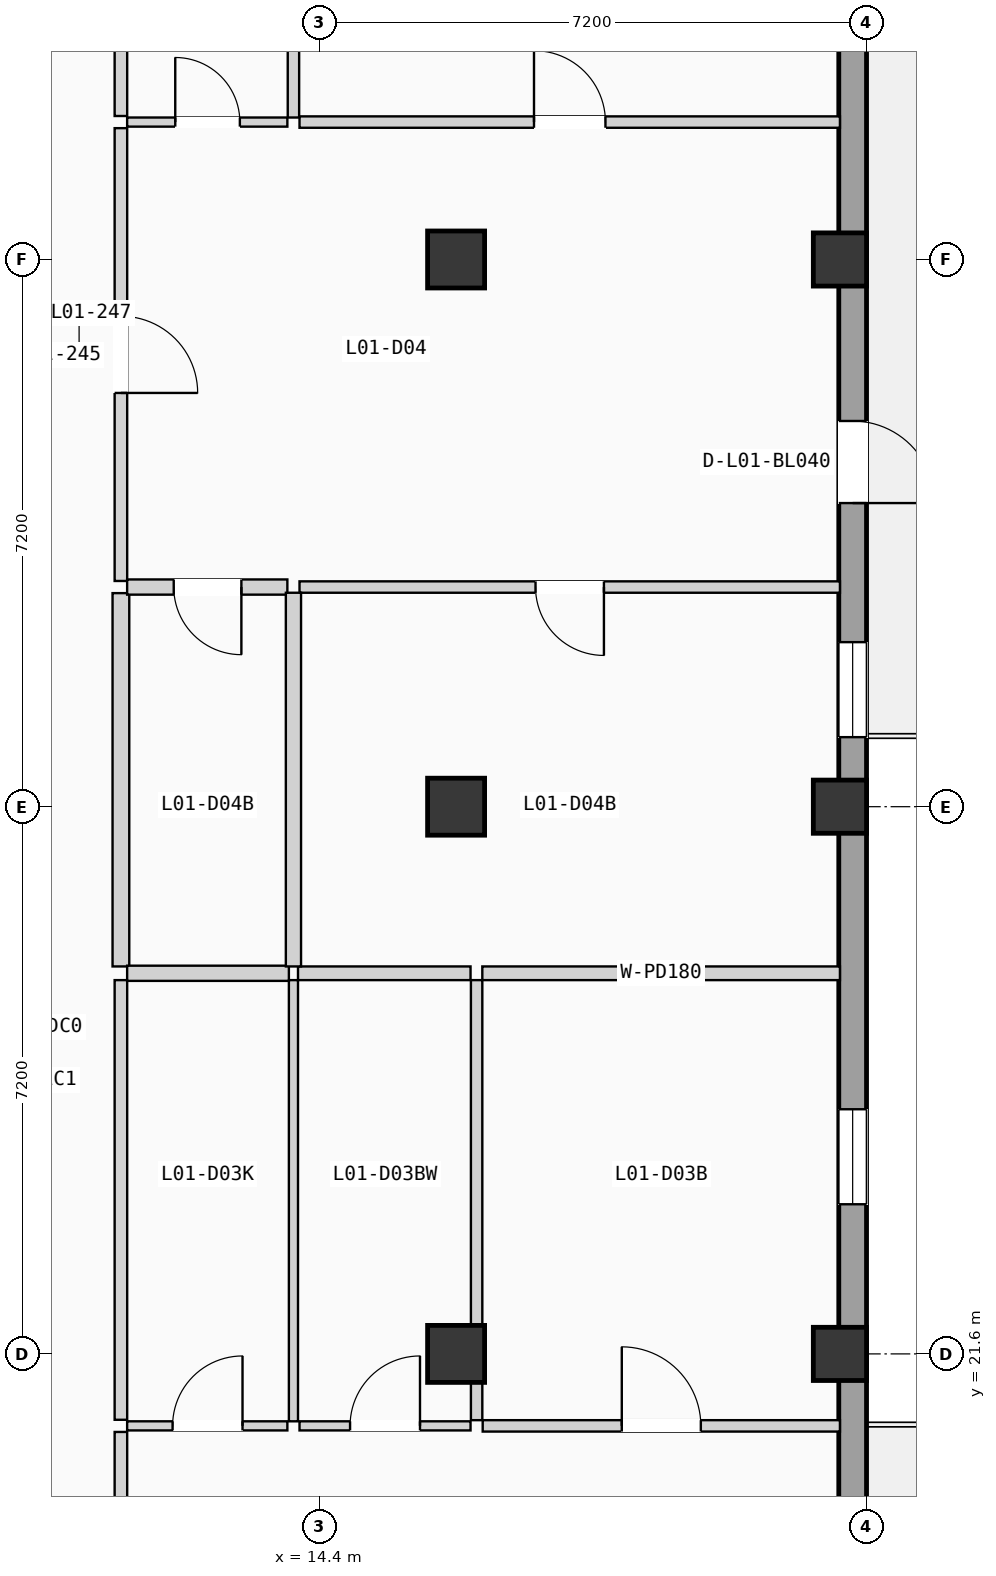
"""IFC4 building model, lengths in metres.
Left out: names, types, materials, properties, quantities, classifications, styles, units other than length and angle.
Written with IfcOpenShell. Run it as: python <this file> out.ifc"""

import sys

from ifc_helpers import new_model, si_unit, direction, frame, frame_2d, origin, origin_2d, place, context, subcontext, project, spatial, rectangle, extrude, element, fill, save


model = new_model("IFC4")
c1 = context("Model", 3, precision=1e-05, world=origin(), true_north=direction((0.0, 1.0)))
c2 = subcontext(c1, "Body", "Model", "MODEL_VIEW")
j1 = project(units=[si_unit("LENGTHUNIT", "METRE"), si_unit("PLANEANGLEUNIT", "RADIAN")], contexts=[c1])
p1 = place(None, origin())
s1 = spatial("IfcSite", under=j1, at=p1, CompositionType="ELEMENT")
p2 = place(p1, origin())
s2 = spatial("IfcBuilding", under=s1, at=p2, CompositionType="ELEMENT")
p3 = place(p2, frame((0.0, 0.0, 4.9)))
s3 = spatial("IfcBuildingStorey", under=s2, at=p3, CompositionType="ELEMENT", Elevation=4.9)
for number, where, z_axis, x_axis in (
    (1, (16.2, 21.6, 0.0), (0.0, 0.0, 1.0), (1.0, 0.0, 0.0)),
    (2, (16.2, 28.8, 0.0), (0.0, 0.0, 1.0), (1.0, 0.0, 0.0)),
    (3, (16.2, 36.0, 0.0), (0.0, 0.0, 1.0), (1.0, 0.0, 0.0)),
):
    element("IfcColumn", number, at=place(p3, frame(where, z_axis=z_axis, x_axis=x_axis)), inside=s3, PredefinedType="COLUMN", context=c2, shape_type="SweptSolid", body=[
        extrude(rectangle(XDim=0.75, YDim=0.75, at=origin_2d()), origin(), (0.0, 0.0, 1.0), 3.675),
    ])
for number, where, z_axis, x_axis in (
    (4, (21.25, 21.6, 0.0), (0.0, 0.0, 1.0), (1.0, 0.0, 0.0)),
    (5, (21.25, 28.8, 0.0), (0.0, 0.0, 1.0), (1.0, 0.0, 0.0)),
    (6, (21.25, 36.0, 0.0), (0.0, 0.0, 1.0), (1.0, 0.0, 0.0)),
):
    element("IfcColumn", number, at=place(p3, frame(where, z_axis=z_axis, x_axis=x_axis)), inside=s3, PredefinedType="COLUMN", context=c2, shape_type="SweptSolid", body=[
        extrude(rectangle(XDim=0.7, YDim=0.7, at=origin_2d()), origin(), (0.0, 0.0, 1.0), 3.675),
    ])
p4 = place(p3, frame((21.417, 0.365, 0.0), z_axis=(0.0, 0.0, 1.0), x_axis=(0.0, 1.0, 0.0)))
e7 = element("IfcWall", 7, at=p4, inside=s3, PredefinedType="SOLIDWALL", context=c2, shape_type="SweptSolid", body=[
    extrude(rectangle(XDim=49.67, YDim=0.365, at=frame_2d((24.835, 0.0))), origin(), (0.0, 0.0, 1.0), 3.415),
])
p5 = place(p4, frame((16.335, 0.0, 0.0)))
e8 = element("IfcOpeningElement", 8, at=p5, cuts=e7, PredefinedType="OPENING", context=c2, shape_type="SweptSolid", body=[
    extrude(rectangle(XDim=0.95, YDim=2.15, at=frame_2d((0.475, 1.075))), frame((0.0, 0.192, 0.0), z_axis=(0.0, -1.0, 0.0), x_axis=(1.0, 0.0, 0.0)), (0.0, 0.0, 1.0), 0.385),
])
p6 = place(p4, frame((9.502, 0.0, 0.9)))
e9 = element("IfcOpeningElement", 9, at=p6, cuts=e7, PredefinedType="OPENING", context=c2, shape_type="SweptSolid", body=[
    extrude(rectangle(XDim=1.25, YDim=1.2, at=frame_2d((0.625, 0.6))), frame((0.0, 0.192, 0.0), z_axis=(0.0, -1.0, 0.0), x_axis=(1.0, 0.0, 0.0)), (0.0, 0.0, 1.0), 0.385),
])
p7 = place(p4, frame((23.204, 0.0, 0.9)))
e10 = element("IfcOpeningElement", 10, at=p7, cuts=e7, PredefinedType="OPENING", context=c2, shape_type="SweptSolid", body=[
    extrude(rectangle(XDim=1.25, YDim=1.35, at=frame_2d((0.625, 0.675))), frame((0.0, 0.192, 0.0), z_axis=(0.0, -1.0, 0.0), x_axis=(1.0, 0.0, 0.0)), (0.0, 0.0, 1.0), 0.385),
])
p8 = place(p4, frame((32.43, 0.0, 0.0)))
e11 = element("IfcOpeningElement", 11, at=p8, cuts=e7, PredefinedType="OPENING", context=c2, shape_type="SweptSolid", body=[
    extrude(rectangle(XDim=1.08, YDim=2.18, at=frame_2d((0.54, 1.09))), frame((0.0, 0.192, 0.0), z_axis=(0.0, -1.0, 0.0), x_axis=(1.0, 0.0, 0.0)), (0.0, 0.0, 1.0), 0.385),
])
p9 = place(p4, frame((29.35, 0.0, 0.9)))
e12 = element("IfcOpeningElement", 12, at=p9, cuts=e7, PredefinedType="OPENING", context=c2, shape_type="SweptSolid", body=[
    extrude(rectangle(XDim=1.25, YDim=1.5, at=frame_2d((0.625, 0.75))), frame((0.0, 0.192, 0.0), z_axis=(0.0, -1.0, 0.0), x_axis=(1.0, 0.0, 0.0)), (0.0, 0.0, 1.0), 0.385),
])
p10 = place(p4, frame((39.354, 0.0, 0.9)))
e13 = element("IfcOpeningElement", 13, at=p10, cuts=e7, PredefinedType="OPENING", context=c2, shape_type="SweptSolid", body=[
    extrude(rectangle(XDim=1.25, YDim=1.65, at=frame_2d((0.625, 0.825))), frame((0.0, 0.192, 0.0), z_axis=(0.0, -1.0, 0.0), x_axis=(1.0, 0.0, 0.0)), (0.0, 0.0, 1.0), 0.385),
])
p11 = place(p3, frame((11.79, 13.545, 0.0), z_axis=(0.0, 0.0, 1.0), x_axis=(0.0, 1.0, 0.0)))
e14 = element("IfcWall", 14, at=p11, inside=s3, PredefinedType="PARTITIONING", context=c2, shape_type="SweptSolid", body=[
    extrude(rectangle(XDim=7.028, YDim=0.165, at=frame_2d((3.514, 0.0))), origin(), (0.0, 0.0, 1.0), 3.395),
])
p12 = place(p11, frame((3.009, 0.0, 0.0)))
e15 = element("IfcOpeningElement", 15, at=p12, cuts=e14, PredefinedType="OPENING", context=c2, shape_type="SweptSolid", body=[
    extrude(rectangle(XDim=1.01, YDim=2.11, at=frame_2d((0.505, 1.055))), frame((0.0, 0.093, 0.0), z_axis=(0.0, -1.0, 0.0), x_axis=(1.0, 0.0, 0.0)), (0.0, 0.0, 1.0), 0.185),
])
p13 = place(p3, frame((11.79, 20.733, 0.0), z_axis=(0.0, 0.0, 1.0), x_axis=(0.0, 1.0, 0.0)))
e16 = element("IfcWall", 16, at=p13, inside=s3, PredefinedType="PARTITIONING", context=c2, shape_type="SweptSolid", body=[
    extrude(rectangle(XDim=5.785, YDim=0.165, at=frame_2d((2.893, 0.0))), origin(), (0.0, 0.0, 1.0), 3.395),
])
p14 = place(p3, frame((11.79, 31.77, 0.0), z_axis=(0.0, 0.0, 1.0), x_axis=(0.0, 1.0, 0.0)))
e17 = element("IfcWall", 17, at=p14, inside=s3, PredefinedType="PARTITIONING", context=c2, shape_type="SweptSolid", body=[
    extrude(rectangle(XDim=5.958, YDim=0.165, at=frame_2d((2.979, 0.0))), origin(), (0.0, 0.0, 1.0), 3.395),
])
p15 = place(p14, frame((2.474, 0.0, 0.0)))
e18 = element("IfcOpeningElement", 18, at=p15, cuts=e17, PredefinedType="OPENING", context=c2, shape_type="SweptSolid", body=[
    extrude(rectangle(XDim=1.01, YDim=2.11, at=frame_2d((0.505, 1.055))), frame((0.0, 0.093, 0.0), z_axis=(0.0, -1.0, 0.0), x_axis=(1.0, 0.0, 0.0)), (0.0, 0.0, 1.0), 0.185),
])
p16 = place(p3, frame((11.79, 26.698, 0.0), z_axis=(0.0, 0.0, 1.0), x_axis=(0.0, 1.0, 0.0)))
e19 = element("IfcWall", 19, at=p16, inside=s3, PredefinedType="PLUMBINGWALL", context=c2, shape_type="SweptSolid", body=[
    extrude(rectangle(XDim=4.912, YDim=0.22, at=frame_2d((2.456, 0.0))), origin(), (0.0, 0.0, 1.0), 3.395),
])
p17 = place(p3, frame((11.79, 37.888, 0.0), z_axis=(0.0, 0.0, 1.0), x_axis=(0.0, 1.0, 0.0)))
e20 = element("IfcWall", 20, at=p17, inside=s3, PredefinedType="PARTITIONING", context=c2, shape_type="SweptSolid", body=[
    extrude(rectangle(XDim=4.912, YDim=0.165, at=frame_2d((2.456, 0.0))), origin(), (0.0, 0.0, 1.0), 3.395),
])
p18 = place(p3, frame((11.872, 20.653, 0.0), z_axis=(0.0, 0.0, 1.0), x_axis=(1.0, 0.0, 0.0)))
e21 = element("IfcWall", 21, at=p18, inside=s3, PredefinedType="PARTITIONING", context=c2, shape_type="SweptSolid", body=[
    extrude(rectangle(XDim=2.108, YDim=0.12, at=frame_2d((1.054, 0.0))), origin(), (0.0, 0.0, 1.0), 3.395),
])
p19 = place(p18, frame((0.598, 0.0, 0.0)))
e22 = element("IfcOpeningElement", 22, at=p19, cuts=e21, PredefinedType="OPENING", context=c2, shape_type="SweptSolid", body=[
    extrude(rectangle(XDim=0.92, YDim=2.02, at=frame_2d((0.46, 1.01))), frame((0.0, 0.07, 0.0), z_axis=(0.0, -1.0, 0.0), x_axis=(1.0, 0.0, 0.0)), (0.0, 0.0, 1.0), 0.14),
])
p20 = place(p3, frame((16.55, 20.653, 0.0), z_axis=(0.0, 0.0, 1.0), x_axis=(1.0, 0.0, 0.0)))
e23 = element("IfcWall", 23, at=p20, inside=s3, PredefinedType="PARTITIONING", context=c2, shape_type="SweptSolid", body=[
    extrude(rectangle(XDim=4.7, YDim=0.15, at=frame_2d((2.35, 0.0))), origin(), (0.0, 0.0, 1.0), 3.395),
])
p21 = place(p20, frame((1.83, 0.0, 0.0)))
e24 = element("IfcOpeningElement", 24, at=p21, cuts=e23, PredefinedType="OPENING", context=c2, shape_type="SweptSolid", body=[
    extrude(rectangle(XDim=1.04, YDim=2.08, at=frame_2d((0.52, 1.04))), frame((0.0, 0.085, 0.0), z_axis=(0.0, -1.0, 0.0), x_axis=(1.0, 0.0, 0.0)), (0.0, 0.0, 1.0), 0.17),
])
p22 = place(p3, frame((14.14, 20.653, 0.0), z_axis=(0.0, 0.0, 1.0), x_axis=(1.0, 0.0, 0.0)))
e25 = element("IfcWall", 25, at=p22, inside=s3, PredefinedType="PARTITIONING", context=c2, shape_type="SweptSolid", body=[
    extrude(rectangle(XDim=2.25, YDim=0.12, at=frame_2d((1.125, 0.0))), origin(), (0.0, 0.0, 1.0), 3.395),
])
p23 = place(p22, frame((0.665, 0.0, 0.0)))
e26 = element("IfcOpeningElement", 26, at=p23, cuts=e25, PredefinedType="OPENING", context=c2, shape_type="SweptSolid", body=[
    extrude(rectangle(XDim=0.92, YDim=2.02, at=frame_2d((0.46, 1.01))), frame((0.0, 0.07, 0.0), z_axis=(0.0, -1.0, 0.0), x_axis=(1.0, 0.0, 0.0)), (0.0, 0.0, 1.0), 0.14),
])
p24 = place(p3, frame((14.06, 20.713, 0.0), z_axis=(0.0, 0.0, 1.0), x_axis=(0.0, 1.0, 0.0)))
e27 = element("IfcWall", 27, at=p24, inside=s3, PredefinedType="PARTITIONING", context=c2, shape_type="SweptSolid", body=[
    extrude(rectangle(XDim=5.805, YDim=0.12, at=frame_2d((2.903, 0.0))), origin(), (0.0, 0.0, 1.0), 3.395),
])
p25 = place(p3, frame((11.872, 26.608, 0.0), z_axis=(0.0, 0.0, 1.0), x_axis=(1.0, 0.0, 0.0)))
e28 = element("IfcWall", 28, at=p25, inside=s3, PredefinedType="PLUMBINGWALL", context=c2, shape_type="SweptSolid", body=[
    extrude(rectangle(XDim=2.128, YDim=0.2, at=frame_2d((1.064, 0.0))), origin(), (0.0, 0.0, 1.0), 3.395),
])
p26 = place(p3, frame((16.47, 20.728, 0.0), z_axis=(0.0, 0.0, 1.0), x_axis=(0.0, 1.0, 0.0)))
e29 = element("IfcWall", 29, at=p26, inside=s3, PredefinedType="PARTITIONING", context=c2, shape_type="SweptSolid", body=[
    extrude(rectangle(XDim=5.79, YDim=0.15, at=frame_2d((2.895, 0.0))), origin(), (0.0, 0.0, 1.0), 3.395),
])
p27 = place(p3, frame((16.545, 26.608, 0.0), z_axis=(0.0, 0.0, 1.0), x_axis=(1.0, 0.0, 0.0)))
e30 = element("IfcWall", 30, at=p27, inside=s3, PredefinedType="PARTITIONING", context=c2, shape_type="SweptSolid", body=[
    extrude(rectangle(XDim=4.705, YDim=0.18, at=frame_2d((2.353, 0.0))), origin(), (0.0, 0.0, 1.0), 3.395),
])
p28 = place(p3, frame((14.12, 26.608, 0.0), z_axis=(0.0, 0.0, 1.0), x_axis=(1.0, 0.0, 0.0)))
e31 = element("IfcWall", 31, at=p28, inside=s3, PredefinedType="PARTITIONING", context=c2, shape_type="SweptSolid", body=[
    extrude(rectangle(XDim=2.27, YDim=0.18, at=frame_2d((1.135, 0.0))), origin(), (0.0, 0.0, 1.0), 3.395),
])
p29 = place(p3, frame((11.872, 31.69, 0.0), z_axis=(0.0, 0.0, 1.0), x_axis=(1.0, 0.0, 0.0)))
e32 = element("IfcWall", 32, at=p29, inside=s3, PredefinedType="PLUMBINGWALL", context=c2, shape_type="SweptSolid", body=[
    extrude(rectangle(XDim=2.108, YDim=0.2, at=frame_2d((1.054, 0.0))), origin(), (0.0, 0.0, 1.0), 3.395),
])
p30 = place(p29, frame((0.613, 0.0, 0.0)))
e33 = element("IfcOpeningElement", 33, at=p30, cuts=e32, PredefinedType="OPENING", context=c2, shape_type="SweptSolid", body=[
    extrude(rectangle(XDim=0.89, YDim=2.03, at=frame_2d((0.445, 1.015))), frame((0.0, 0.11, 0.0), z_axis=(0.0, -1.0, 0.0), x_axis=(1.0, 0.0, 0.0)), (0.0, 0.0, 1.0), 0.22),
])
p31 = place(p3, frame((11.872, 37.808, 0.0), z_axis=(0.0, 0.0, 1.0), x_axis=(1.0, 0.0, 0.0)))
e34 = element("IfcWall", 34, at=p31, inside=s3, PredefinedType="PARTITIONING", context=c2, shape_type="SweptSolid", body=[
    extrude(rectangle(XDim=2.108, YDim=0.12, at=frame_2d((1.054, 0.0))), origin(), (0.0, 0.0, 1.0), 3.395),
])
p32 = place(p31, frame((0.633, 0.0, 0.0)))
e35 = element("IfcOpeningElement", 35, at=p32, cuts=e34, PredefinedType="OPENING", context=c2, shape_type="SweptSolid", body=[
    extrude(rectangle(XDim=0.85, YDim=2.01, at=frame_2d((0.425, 1.005))), frame((0.0, 0.07, 0.0), z_axis=(0.0, -1.0, 0.0), x_axis=(1.0, 0.0, 0.0)), (0.0, 0.0, 1.0), 0.14),
])
p33 = place(p3, frame((14.14, 31.69, 0.0), z_axis=(0.0, 0.0, 1.0), x_axis=(1.0, 0.0, 0.0)))
e36 = element("IfcWall", 36, at=p33, inside=s3, PredefinedType="PARTITIONING", context=c2, shape_type="SweptSolid", body=[
    extrude(rectangle(XDim=7.11, YDim=0.15, at=frame_2d((3.555, 0.0))), origin(), (0.0, 0.0, 1.0), 3.395),
])
p34 = place(p33, frame((3.105, 0.0, 0.0)))
e37 = element("IfcOpeningElement", 37, at=p34, cuts=e36, PredefinedType="OPENING", context=c2, shape_type="SweptSolid", body=[
    extrude(rectangle(XDim=0.9, YDim=2.04, at=frame_2d((0.45, 1.02))), frame((0.0, 0.085, 0.0), z_axis=(0.0, -1.0, 0.0), x_axis=(1.0, 0.0, 0.0)), (0.0, 0.0, 1.0), 0.17),
])
p35 = place(p3, frame((14.14, 37.808, 0.0), z_axis=(0.0, 0.0, 1.0), x_axis=(1.0, 0.0, 0.0)))
e38 = element("IfcWall", 38, at=p35, inside=s3, PredefinedType="PARTITIONING", context=c2, shape_type="SweptSolid", body=[
    extrude(rectangle(XDim=7.11, YDim=0.15, at=frame_2d((3.555, 0.0))), origin(), (0.0, 0.0, 1.0), 3.395),
])
p36 = place(p35, frame((3.085, 0.0, 0.0)))
e39 = element("IfcOpeningElement", 39, at=p36, cuts=e38, PredefinedType="OPENING", context=c2, shape_type="SweptSolid", body=[
    extrude(rectangle(XDim=0.94, YDim=2.06, at=frame_2d((0.47, 1.03))), frame((0.0, 0.085, 0.0), z_axis=(0.0, -1.0, 0.0), x_axis=(1.0, 0.0, 0.0)), (0.0, 0.0, 1.0), 0.17),
])
p37 = place(p3, frame((14.06, 26.698, 0.0), z_axis=(0.0, 0.0, 1.0), x_axis=(0.0, 1.0, 0.0)))
e40 = element("IfcWall", 40, at=p37, inside=s3, PredefinedType="PLUMBINGWALL", context=c2, shape_type="SweptSolid", body=[
    extrude(rectangle(XDim=4.917, YDim=0.2, at=frame_2d((2.458, 0.0))), origin(), (0.0, 0.0, 1.0), 3.395),
])
p38 = place(p3, frame((14.06, 37.868, 0.0), z_axis=(0.0, 0.0, 1.0), x_axis=(0.0, 1.0, 0.0)))
e41 = element("IfcWall", 41, at=p38, inside=s3, PredefinedType="PARTITIONING", context=c2, shape_type="SweptSolid", body=[
    extrude(rectangle(XDim=4.932, YDim=0.15, at=frame_2d((2.466, 0.0))), origin(), (0.0, 0.0, 1.0), 3.395),
])
p39 = place(p7, origin())
e42 = element("IfcWindow", 42, at=p39, inside=s3, PartitioningType="SINGLE_PANEL", PredefinedType="WINDOW", context=c2, shape_type="SweptSolid", body=[
    extrude(rectangle(XDim=1.25, YDim=1.35, at=frame_2d((0.625, 0.675))), frame((0.0, 0.03, 0.0), z_axis=(0.0, -1.0, 0.0), x_axis=(1.0, 0.0, 0.0)), (0.0, 0.0, 1.0), 0.06),
])
fill(e10, e42)
p40 = place(p8, frame((1.08, 0.0, 0.0), z_axis=(0.0, 0.0, 1.0), x_axis=(-1.0, 0.0, 0.0)))
e43 = element("IfcDoor", 43, at=p40, inside=s3, OperationType="SINGLE_SWING_LEFT", PredefinedType="DOOR", context=c2, shape_type="SweptSolid", body=[
    extrude(rectangle(XDim=1.08, YDim=2.18, at=frame_2d((0.54, 1.09))), frame((0.0, 0.025, 0.0), z_axis=(0.0, -1.0, 0.0), x_axis=(1.0, 0.0, 0.0)), (0.0, 0.0, 1.0), 0.05),
])
fill(e11, e43)
p41 = place(p9, origin())
e44 = element("IfcWindow", 44, at=p41, inside=s3, PartitioningType="SINGLE_PANEL", PredefinedType="WINDOW", context=c2, shape_type="SweptSolid", body=[
    extrude(rectangle(XDim=1.25, YDim=1.5, at=frame_2d((0.625, 0.75))), frame((0.0, 0.03, 0.0), z_axis=(0.0, -1.0, 0.0), x_axis=(1.0, 0.0, 0.0)), (0.0, 0.0, 1.0), 0.06),
])
fill(e12, e44)
p42 = place(p15, frame((1.01, 0.0, 0.0), z_axis=(0.0, 0.0, 1.0), x_axis=(-1.0, 0.0, 0.0)))
e45 = element("IfcDoor", 45, at=p42, inside=s3, OperationType="SINGLE_SWING_LEFT", PredefinedType="DOOR", context=c2, shape_type="SweptSolid", body=[
    extrude(rectangle(XDim=1.01, YDim=2.11, at=frame_2d((0.505, 1.055))), frame((0.0, 0.025, 0.0), z_axis=(0.0, -1.0, 0.0), x_axis=(1.0, 0.0, 0.0)), (0.0, 0.0, 1.0), 0.05),
])
fill(e18, e45)
p43 = place(p19, origin())
e46 = element("IfcDoor", 46, at=p43, inside=s3, OperationType="SINGLE_SWING_RIGHT", PredefinedType="DOOR", context=c2, shape_type="SweptSolid", body=[
    extrude(rectangle(XDim=0.92, YDim=2.02, at=frame_2d((0.46, 1.01))), frame((0.0, 0.025, 0.0), z_axis=(0.0, -1.0, 0.0), x_axis=(1.0, 0.0, 0.0)), (0.0, 0.0, 1.0), 0.05),
])
fill(e22, e46)
p44 = place(p21, origin())
e47 = element("IfcDoor", 47, at=p44, inside=s3, OperationType="SINGLE_SWING_LEFT", PredefinedType="DOOR", context=c2, shape_type="SweptSolid", body=[
    extrude(rectangle(XDim=1.04, YDim=2.08, at=frame_2d((0.52, 1.04))), frame((0.0, 0.025, 0.0), z_axis=(0.0, -1.0, 0.0), x_axis=(1.0, 0.0, 0.0)), (0.0, 0.0, 1.0), 0.05),
])
fill(e24, e47)
p45 = place(p23, origin())
e48 = element("IfcDoor", 48, at=p45, inside=s3, OperationType="SINGLE_SWING_RIGHT", PredefinedType="DOOR", context=c2, shape_type="SweptSolid", body=[
    extrude(rectangle(XDim=0.92, YDim=2.02, at=frame_2d((0.46, 1.01))), frame((0.0, 0.025, 0.0), z_axis=(0.0, -1.0, 0.0), x_axis=(1.0, 0.0, 0.0)), (0.0, 0.0, 1.0), 0.05),
])
fill(e26, e48)
p46 = place(p30, frame((0.89, 0.0, 0.0), z_axis=(0.0, 0.0, 1.0), x_axis=(-1.0, 0.0, 0.0)))
e49 = element("IfcDoor", 49, at=p46, inside=s3, OperationType="SINGLE_SWING_RIGHT", PredefinedType="DOOR", context=c2, shape_type="SweptSolid", body=[
    extrude(rectangle(XDim=0.89, YDim=2.03, at=frame_2d((0.445, 1.015))), frame((0.0, 0.025, 0.0), z_axis=(0.0, -1.0, 0.0), x_axis=(1.0, 0.0, 0.0)), (0.0, 0.0, 1.0), 0.05),
])
fill(e33, e49)
p47 = place(p32, origin())
e50 = element("IfcDoor", 50, at=p47, inside=s3, OperationType="SINGLE_SWING_LEFT", PredefinedType="DOOR", context=c2, shape_type="SweptSolid", body=[
    extrude(rectangle(XDim=0.85, YDim=2.01, at=frame_2d((0.425, 1.005))), frame((0.0, 0.025, 0.0), z_axis=(0.0, -1.0, 0.0), x_axis=(1.0, 0.0, 0.0)), (0.0, 0.0, 1.0), 0.05),
])
fill(e35, e50)
p48 = place(p34, frame((0.9, 0.0, 0.0), z_axis=(0.0, 0.0, 1.0), x_axis=(-1.0, 0.0, 0.0)))
e51 = element("IfcDoor", 51, at=p48, inside=s3, OperationType="SINGLE_SWING_RIGHT", PredefinedType="DOOR", context=c2, shape_type="SweptSolid", body=[
    extrude(rectangle(XDim=0.9, YDim=2.04, at=frame_2d((0.45, 1.02))), frame((0.0, 0.025, 0.0), z_axis=(0.0, -1.0, 0.0), x_axis=(1.0, 0.0, 0.0)), (0.0, 0.0, 1.0), 0.05),
])
fill(e37, e51)
p49 = place(p36, origin())
e52 = element("IfcDoor", 52, at=p49, inside=s3, OperationType="SINGLE_SWING_LEFT", PredefinedType="DOOR", context=c2, shape_type="SweptSolid", body=[
    extrude(rectangle(XDim=0.94, YDim=2.06, at=frame_2d((0.47, 1.03))), frame((0.0, 0.025, 0.0), z_axis=(0.0, -1.0, 0.0), x_axis=(1.0, 0.0, 0.0)), (0.0, 0.0, 1.0), 0.05),
])
fill(e39, e52)
save(model, sys.argv[1])
